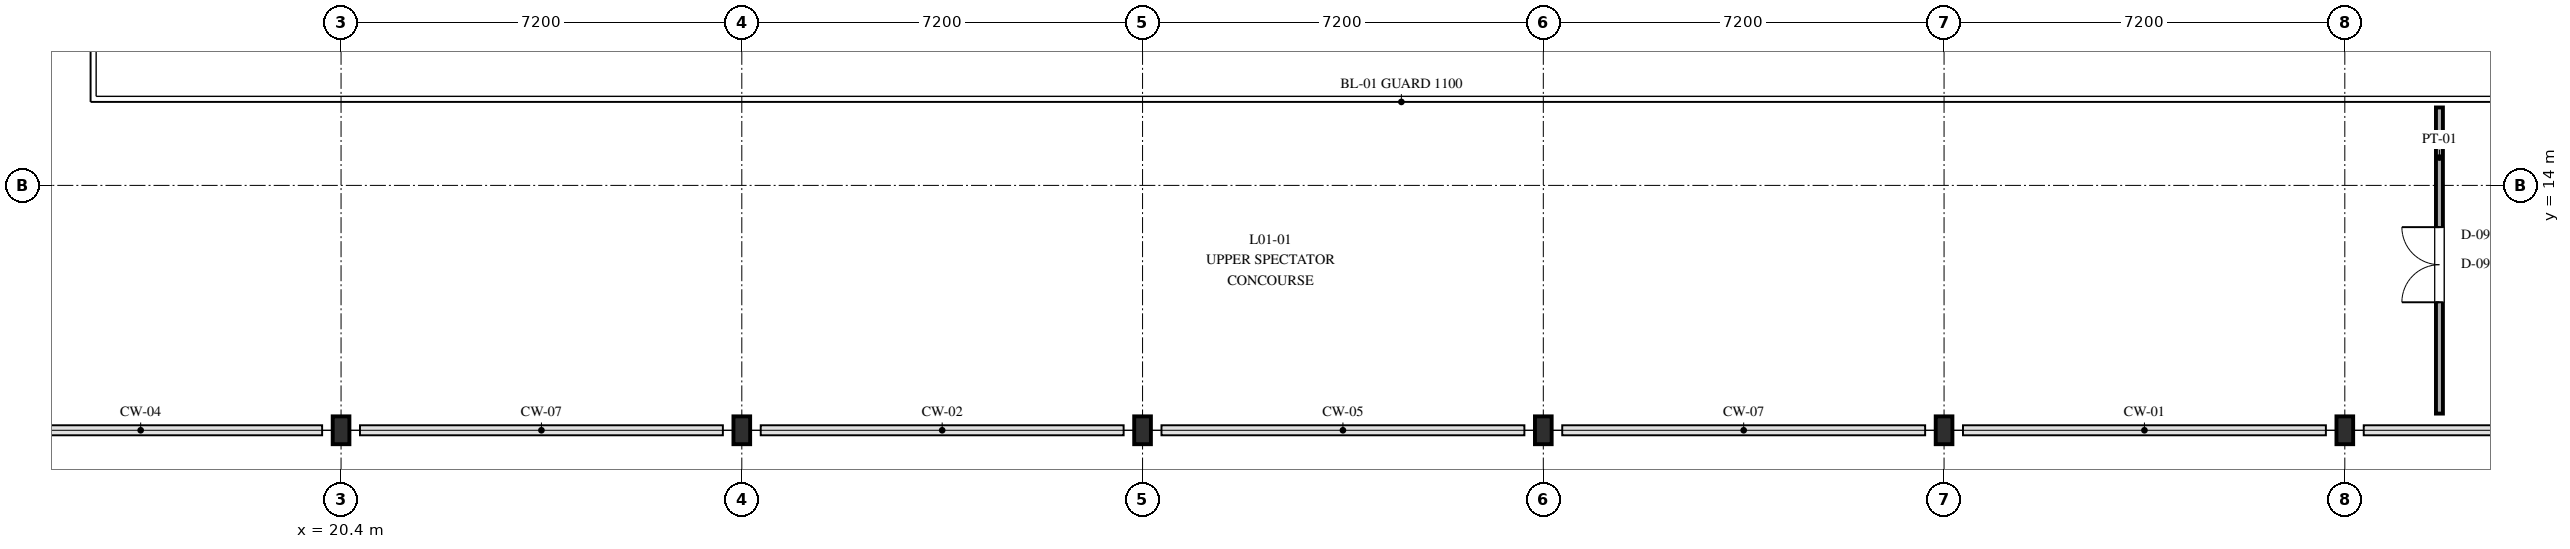
"""IFC4 building model, lengths in metres.
Left out: names, types, materials, properties, quantities, classifications, styles, units other than length and angle.
Written with IfcOpenShell. Run it as: python <this file> out.ifc"""

import sys

from ifc_helpers import new_model, si_unit, direction, frame, frame_2d, origin, origin_2d, place, context, subcontext, project, spatial, rectangle, i_section, extrude, element, fill, save


model = new_model("IFC4")
c1 = context("Model", 3, precision=1e-05, world=origin(), true_north=direction((0.0, 1.0)))
c2 = subcontext(c1, "Body", "Model", "MODEL_VIEW")
j1 = project(units=[si_unit("LENGTHUNIT", "METRE"), si_unit("PLANEANGLEUNIT", "RADIAN")], contexts=[c1])
p1 = place(None, origin())
s1 = spatial("IfcSite", under=j1, at=p1, CompositionType="ELEMENT")
p2 = place(p1, origin())
s2 = spatial("IfcBuilding", under=s1, at=p2, CompositionType="ELEMENT")
p3 = place(p2, frame((0.0, 0.0, 4.8)))
s3 = spatial("IfcBuildingStorey", under=s2, at=p3, CompositionType="ELEMENT", Elevation=4.8)
for number, where, z_axis, x_axis in (
    (1, (20.4, 9.6, 0.0), (0.0, 0.0, 1.0), (1.0, 0.0, 0.0)),
    (2, (27.6, 9.6, 0.0), (0.0, 0.0, 1.0), (1.0, 0.0, 0.0)),
    (3, (34.8, 9.6, 0.0), (0.0, 0.0, 1.0), (1.0, 0.0, 0.0)),
):
    element("IfcColumn", number, at=place(p3, frame(where, z_axis=z_axis, x_axis=x_axis)), inside=s3, PredefinedType="COLUMN", context=c2, shape_type="SweptSolid", body=[
        extrude(i_section(OverallWidth=0.3, OverallDepth=0.5, WebThickness=0.014, FlangeThickness=0.028, FilletRadius=0.027, at=origin_2d()), origin(), (0.0, 0.0, 1.0), 4.8),
    ])
p4 = place(p3, frame((42.0, 9.6, 0.0), z_axis=(0.0, 0.0, 1.0), x_axis=(1.0, 0.0, 0.0)))
e4 = element("IfcColumn", 4, at=p4, inside=s3, PredefinedType="COLUMN", context=c2, shape_type="SweptSolid", body=[
    extrude(i_section(OverallWidth=0.3, OverallDepth=0.5, WebThickness=0.014, FlangeThickness=0.028, FilletRadius=0.027, at=origin_2d()), origin(), (0.0, 0.0, 1.0), 4.3),
])
for number, where, z_axis, x_axis in (
    (5, (49.2, 9.6, 0.0), (0.0, 0.0, 1.0), (1.0, 0.0, 0.0)),
    (6, (56.4, 9.6, 0.0), (0.0, 0.0, 1.0), (1.0, 0.0, 0.0)),
):
    element("IfcColumn", number, at=place(p3, frame(where, z_axis=z_axis, x_axis=x_axis)), inside=s3, PredefinedType="COLUMN", context=c2, shape_type="SweptSolid", body=[
        extrude(i_section(OverallWidth=0.3, OverallDepth=0.5, WebThickness=0.014, FlangeThickness=0.028, FilletRadius=0.027, at=origin_2d()), origin(), (0.0, 0.0, 1.0), 4.8),
    ])
p5 = place(p3, frame((58.1, 9.9, 0.0), z_axis=(0.0, 0.0, 1.0), x_axis=(0.0, 1.0, 0.0)))
e7 = element("IfcWall", 7, at=p5, inside=s3, PredefinedType="PARTITIONING", context=c2, shape_type="SweptSolid", body=[
    extrude(rectangle(XDim=5.5, YDim=0.125, at=frame_2d((2.75, 0.0))), origin(), (0.0, 0.0, 1.0), 3.95),
])
p6 = place(p5, frame((2.0, 0.0, 0.0)))
e8 = element("IfcOpeningElement", 8, at=p6, cuts=e7, PredefinedType="OPENING", context=c2, shape_type="SweptSolid", body=[
    extrude(rectangle(XDim=1.35, YDim=2.2, at=frame_2d((0.675, 1.1))), frame((0.0, 0.073, 0.0), z_axis=(0.0, -1.0, 0.0), x_axis=(1.0, 0.0, 0.0)), (0.0, 0.0, 1.0), 0.145),
])
p7 = place(p6, origin())
e9 = element("IfcDoor", 9, at=p7, inside=s3, OperationType="DOUBLE_DOOR_SINGLE_SWING", PredefinedType="DOOR", context=c2, shape_type="SweptSolid", body=[
    extrude(rectangle(XDim=1.35, YDim=2.2, at=frame_2d((0.675, 1.1))), frame((0.0, 0.025, 0.0), z_axis=(0.0, -1.0, 0.0), x_axis=(1.0, 0.0, 0.0)), (0.0, 0.0, 1.0), 0.05),
])
fill(e8, e9)
save(model, sys.argv[1])
